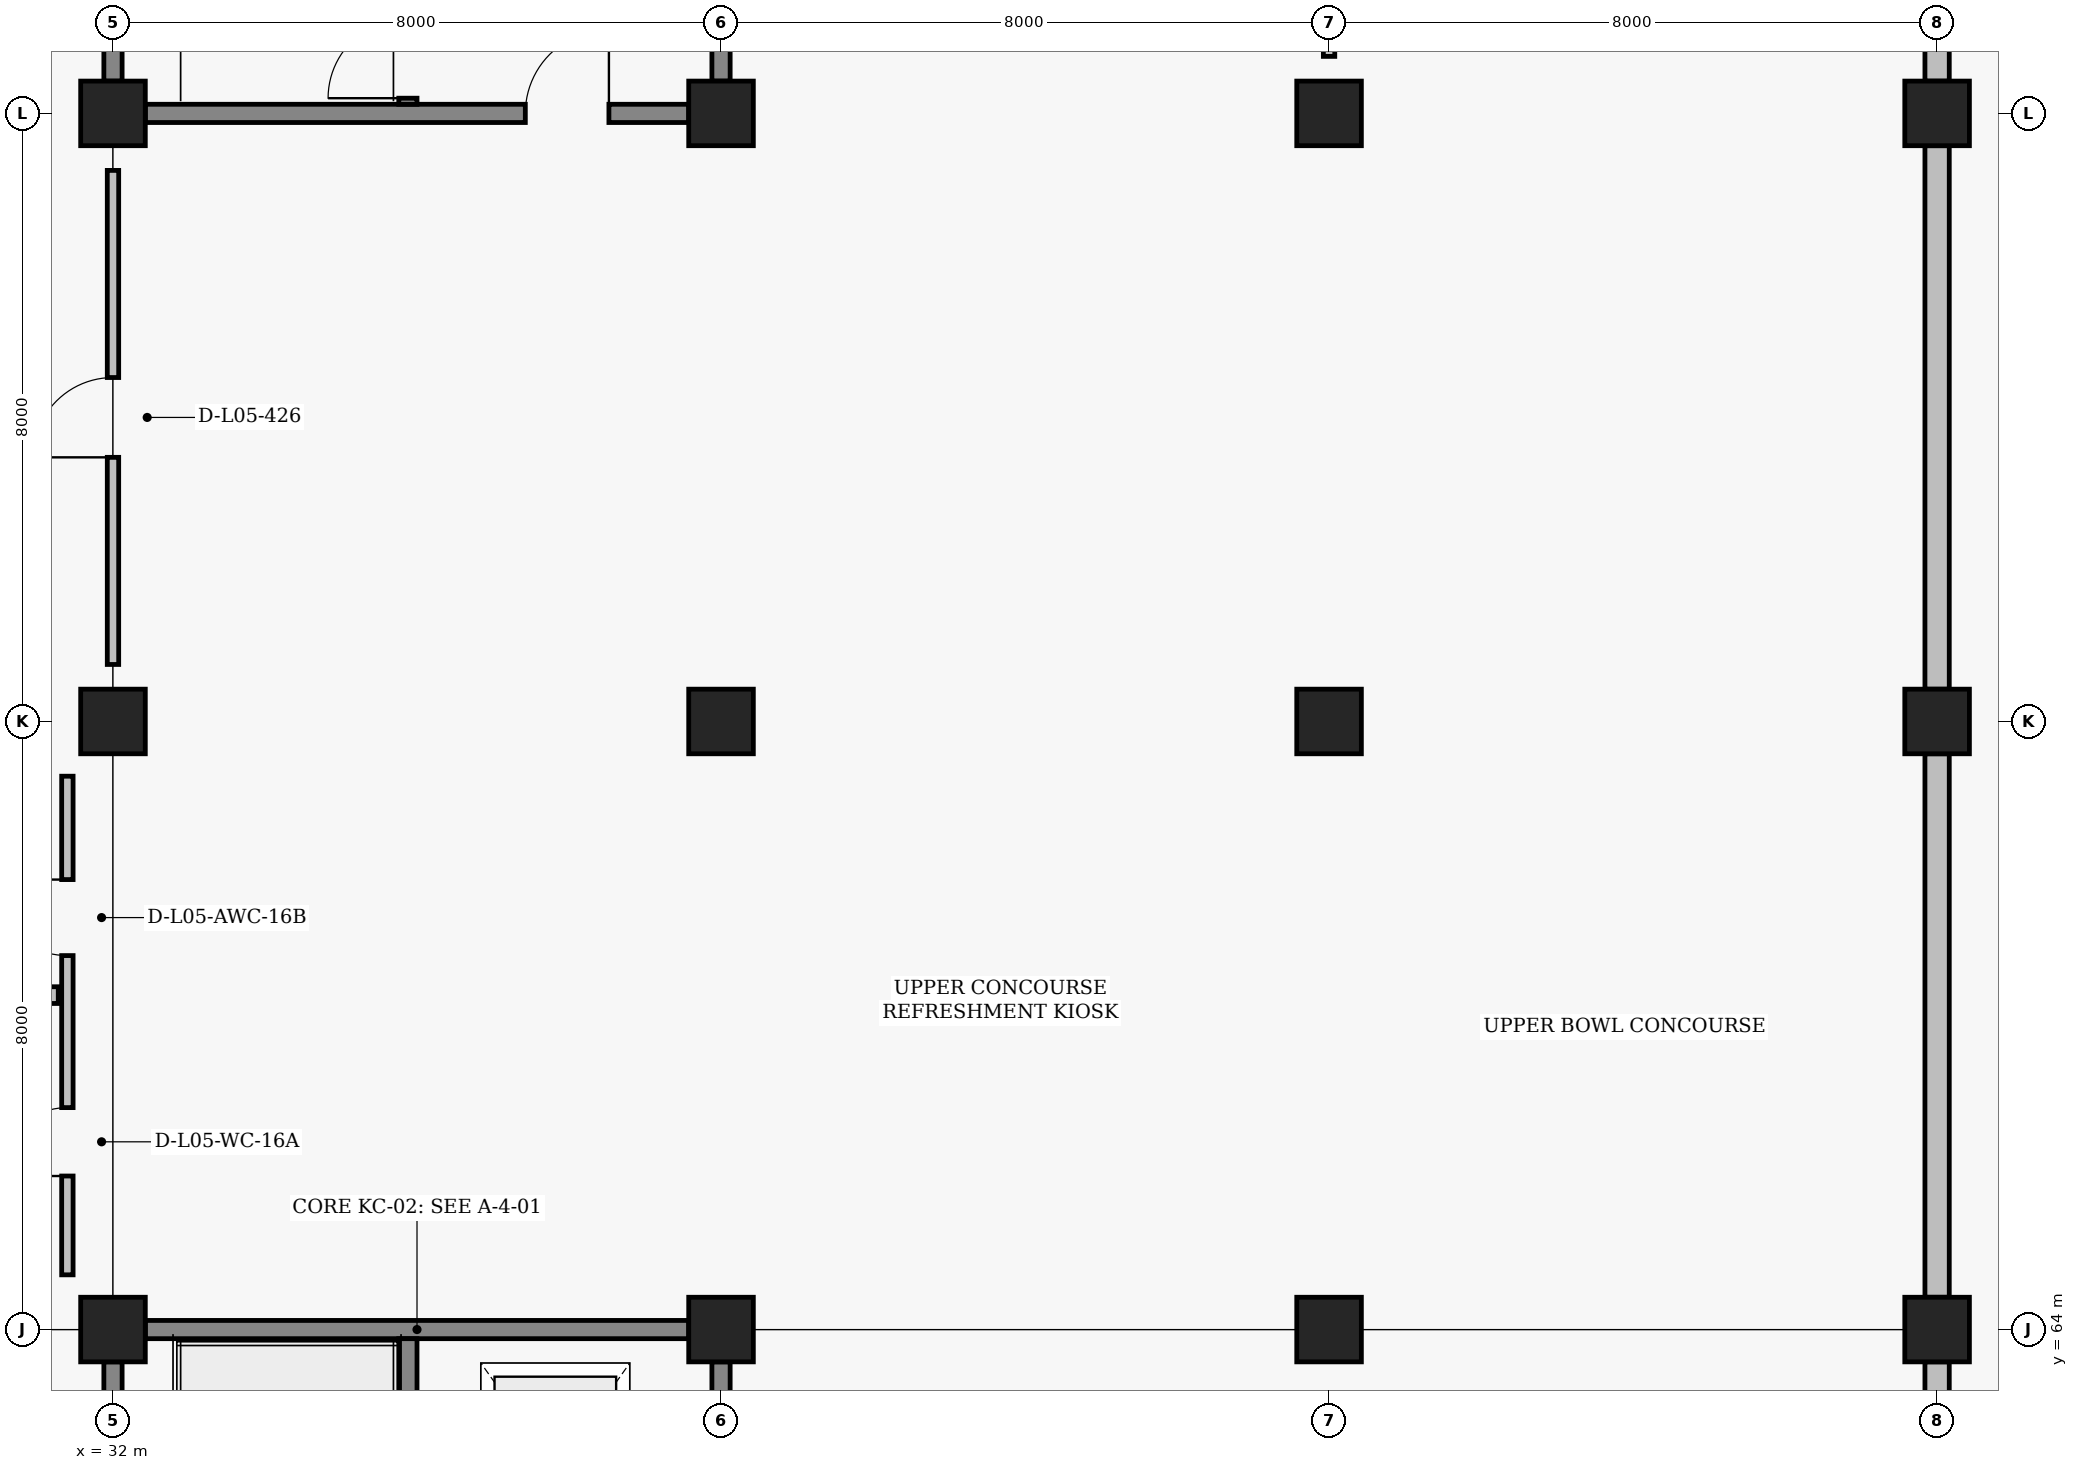
"""IFC4 building model, lengths in metres.
Left out: names, types, materials, properties, quantities, classifications, styles, units other than length and angle.
Written with IfcOpenShell. Run it as: python <this file> out.ifc"""

import sys

from ifc_helpers import new_model, si_unit, direction, frame, frame_2d, origin, origin_2d, place, context, subcontext, project, spatial, rectangle, extrude, element, fill, save


model = new_model("IFC4")
c1 = context("Model", 3, precision=1e-05, world=origin(), true_north=direction((0.0, 1.0)))
c2 = subcontext(c1, "Body", "Model", "MODEL_VIEW")
j1 = project(units=[si_unit("LENGTHUNIT", "METRE"), si_unit("PLANEANGLEUNIT", "RADIAN")], contexts=[c1])
p1 = place(None, origin())
s1 = spatial("IfcSite", under=j1, at=p1, CompositionType="ELEMENT")
p2 = place(p1, origin())
s2 = spatial("IfcBuilding", under=s1, at=p2, CompositionType="ELEMENT")
p3 = place(p2, frame((0.0, 0.0, 18.6)))
s3 = spatial("IfcBuildingStorey", under=s2, at=p3, CompositionType="ELEMENT", Elevation=18.6)
for number, where, z_axis, x_axis in (
    (1, (32.0, 64.0, 0.0), (0.0, 0.0, 1.0), (1.0, 0.0, 0.0)),
    (2, (32.0, 72.0, 0.0), (0.0, 0.0, 1.0), (1.0, 0.0, 0.0)),
    (3, (32.0, 80.0, 0.0), (0.0, 0.0, 1.0), (1.0, 0.0, 0.0)),
    (4, (40.0, 64.0, 0.0), (0.0, 0.0, 1.0), (1.0, 0.0, 0.0)),
    (5, (40.0, 72.0, 0.0), (0.0, 0.0, 1.0), (1.0, 0.0, 0.0)),
    (6, (40.0, 80.0, 0.0), (0.0, 0.0, 1.0), (1.0, 0.0, 0.0)),
    (7, (48.0, 64.0, 0.0), (0.0, 0.0, 1.0), (1.0, 0.0, 0.0)),
    (8, (48.0, 72.0, 0.0), (0.0, 0.0, 1.0), (1.0, 0.0, 0.0)),
    (9, (48.0, 80.0, 0.0), (0.0, 0.0, 1.0), (1.0, 0.0, 0.0)),
    (10, (56.0, 64.0, 0.0), (0.0, 0.0, 1.0), (1.0, 0.0, 0.0)),
    (11, (56.0, 72.0, 0.0), (0.0, 0.0, 1.0), (1.0, 0.0, 0.0)),
    (12, (56.0, 80.0, 0.0), (0.0, 0.0, 1.0), (1.0, 0.0, 0.0)),
):
    element("IfcColumn", number, at=place(p3, frame(where, z_axis=z_axis, x_axis=x_axis)), inside=s3, PredefinedType="COLUMN", context=c2, shape_type="SweptSolid", body=[
        extrude(rectangle(XDim=0.85, YDim=0.85, at=origin_2d()), origin(), (0.0, 0.0, 1.0), 4.2),
    ])
for number, where, z_axis, x_axis in (
    (13, (56.0, 56.425, 0.0), (0.0, 0.0, 1.0), (0.0, 1.0, 0.0)),
    (14, (56.0, 64.425, 0.0), (0.0, 0.0, 1.0), (0.0, 1.0, 0.0)),
    (15, (56.0, 72.425, 0.0), (0.0, 0.0, 1.0), (0.0, 1.0, 0.0)),
    (16, (56.0, 80.425, 0.0), (0.0, 0.0, 1.0), (0.0, 1.0, 0.0)),
):
    element("IfcWall", number, at=place(p3, frame(where, z_axis=z_axis, x_axis=x_axis)), inside=s3, PredefinedType="SOLIDWALL", context=c2, shape_type="SweptSolid", body=[
        extrude(rectangle(XDim=7.15, YDim=0.32, at=frame_2d((3.575, 0.0))), origin(), (0.0, 0.0, 1.0), 3.35),
    ])
for number, where, z_axis, x_axis in (
    (17, (32.425, 64.0, 0.0), (0.0, 0.0, 1.0), (1.0, 0.0, 0.0)),
    (18, (32.0, 56.425, 0.0), (0.0, 0.0, 1.0), (0.0, 1.0, 0.0)),
    (19, (40.0, 56.425, 0.0), (0.0, 0.0, 1.0), (0.0, 1.0, 0.0)),
):
    element("IfcWall", number, at=place(p3, frame(where, z_axis=z_axis, x_axis=x_axis)), inside=s3, PredefinedType="SHEAR", context=c2, shape_type="SweptSolid", body=[
        extrude(rectangle(XDim=7.15, YDim=0.24, at=frame_2d((3.575, 0.0))), origin(), (0.0, 0.0, 1.0), 3.34),
    ])
p4 = place(p3, frame((35.88, 56.12, 0.0), z_axis=(0.0, 0.0, 1.0), x_axis=(0.0, 1.0, 0.0)))
e20 = element("IfcWall", 20, at=p4, inside=s3, PredefinedType="SHEAR", context=c2, shape_type="SweptSolid", body=[
    extrude(rectangle(XDim=7.76, YDim=0.24, at=frame_2d((3.88, 0.0))), origin(), (0.0, 0.0, 1.0), 3.44),
])
p5 = place(p4, frame((0.08, 0.0, 0.0)))
e21 = element("IfcOpeningElement", 21, at=p5, cuts=e20, PredefinedType="OPENING", context=c2, shape_type="SweptSolid", body=[
    extrude(rectangle(XDim=1.05, YDim=2.15, at=frame_2d((0.525, 1.075))), frame((0.0, 0.13, 0.0), z_axis=(0.0, -1.0, 0.0), x_axis=(1.0, 0.0, 0.0)), (0.0, 0.0, 1.0), 0.26),
])
p6 = place(p3, frame((32.425, 80.0, 0.0), z_axis=(0.0, 0.0, 1.0), x_axis=(1.0, 0.0, 0.0)))
e22 = element("IfcWall", 22, at=p6, inside=s3, PredefinedType="SHEAR", context=c2, shape_type="SweptSolid", body=[
    extrude(rectangle(XDim=7.15, YDim=0.24, at=frame_2d((3.575, 0.0))), origin(), (0.0, 0.0, 1.0), 3.34),
])
p7 = place(p6, frame((5.0, 0.0, 0.0)))
e23 = element("IfcOpeningElement", 23, at=p7, cuts=e22, PredefinedType="OPENING", context=c2, shape_type="SweptSolid", body=[
    extrude(rectangle(XDim=1.1, YDim=2.2, at=frame_2d((0.55, 1.1))), frame((0.0, 0.13, 0.0), z_axis=(0.0, -1.0, 0.0), x_axis=(1.0, 0.0, 0.0)), (0.0, 0.0, 1.0), 0.26),
])
for number, where, z_axis, x_axis in (
    (24, (32.0, 80.425, 0.0), (0.0, 0.0, 1.0), (0.0, 1.0, 0.0)),
    (25, (40.0, 80.425, 0.0), (0.0, 0.0, 1.0), (0.0, 1.0, 0.0)),
):
    element("IfcWall", number, at=place(p3, frame(where, z_axis=z_axis, x_axis=x_axis)), inside=s3, PredefinedType="SHEAR", context=c2, shape_type="SweptSolid", body=[
        extrude(rectangle(XDim=7.15, YDim=0.24, at=frame_2d((3.575, 0.0))), origin(), (0.0, 0.0, 1.0), 3.34),
    ])
p8 = place(p3, frame((35.88, 80.12, 0.0), z_axis=(0.0, 0.0, 1.0), x_axis=(0.0, 1.0, 0.0)))
e26 = element("IfcWall", 26, at=p8, inside=s3, PredefinedType="SHEAR", context=c2, shape_type="SweptSolid", body=[
    extrude(rectangle(XDim=7.76, YDim=0.24, at=frame_2d((3.88, 0.0))), origin(), (0.0, 0.0, 1.0), 3.44),
])
p9 = place(p8, frame((0.08, 0.0, 0.0)))
e27 = element("IfcOpeningElement", 27, at=p9, cuts=e26, PredefinedType="OPENING", context=c2, shape_type="SweptSolid", body=[
    extrude(rectangle(XDim=1.05, YDim=2.15, at=frame_2d((0.525, 1.075))), frame((0.0, 0.13, 0.0), z_axis=(0.0, -1.0, 0.0), x_axis=(1.0, 0.0, 0.0)), (0.0, 0.0, 1.0), 0.26),
])
p10 = place(p3, frame((24.72, 68.4, 0.0), z_axis=(0.0, 0.0, 1.0), x_axis=(1.0, 0.0, 0.0)))
e28 = element("IfcWall", 28, at=p10, inside=s3, PredefinedType="PLUMBINGWALL", context=c2, shape_type="SweptSolid", body=[
    extrude(rectangle(XDim=6.56, YDim=0.22, at=frame_2d((3.28, 0.0))), origin(), (0.0, 0.0, 1.0), 3.64),
])
p11 = place(p3, frame((31.4, 64.72, 0.0), z_axis=(0.0, 0.0, 1.0), x_axis=(0.0, 1.0, 0.0)))
e29 = element("IfcWall", 29, at=p11, inside=s3, PredefinedType="PARTITIONING", context=c2, shape_type="SweptSolid", body=[
    extrude(rectangle(XDim=6.56, YDim=0.15, at=frame_2d((3.28, 0.0))), origin(), (0.0, 0.0, 1.0), 3.64),
])
p12 = place(p11, frame((1.3, 0.0, 0.0)))
e30 = element("IfcOpeningElement", 30, at=p12, cuts=e29, PredefinedType="OPENING", context=c2, shape_type="SweptSolid", body=[
    extrude(rectangle(XDim=0.9, YDim=2.1, at=frame_2d((0.45, 1.05))), frame((0.0, 0.085, 0.0), z_axis=(0.0, -1.0, 0.0), x_axis=(1.0, 0.0, 0.0)), (0.0, 0.0, 1.0), 0.17),
])
p13 = place(p11, frame((4.2, 0.0, 0.0)))
e31 = element("IfcOpeningElement", 31, at=p13, cuts=e29, PredefinedType="OPENING", context=c2, shape_type="SweptSolid", body=[
    extrude(rectangle(XDim=1.0, YDim=2.15, at=frame_2d((0.5, 1.075))), frame((0.0, 0.085, 0.0), z_axis=(0.0, -1.0, 0.0), x_axis=(1.0, 0.0, 0.0)), (0.0, 0.0, 1.0), 0.17),
])
p14 = place(p3, frame((32.0, 72.75, 0.0), z_axis=(0.0, 0.0, 1.0), x_axis=(0.0, 1.0, 0.0)))
e32 = element("IfcWall", 32, at=p14, inside=s3, PredefinedType="PARTITIONING", context=c2, shape_type="SweptSolid", body=[
    extrude(rectangle(XDim=6.5, YDim=0.15, at=frame_2d((3.25, 0.0))), origin(), (0.0, 0.0, 1.0), 3.34),
])
p15 = place(p14, frame((2.725, 0.0, 0.0)))
e33 = element("IfcOpeningElement", 33, at=p15, cuts=e32, PredefinedType="OPENING", context=c2, shape_type="SweptSolid", body=[
    extrude(rectangle(XDim=1.05, YDim=2.15, at=frame_2d((0.525, 1.075))), frame((0.0, 0.085, 0.0), z_axis=(0.0, -1.0, 0.0), x_axis=(1.0, 0.0, 0.0)), (0.0, 0.0, 1.0), 0.17),
])
p16 = place(p3, frame((48.0, 80.75, 0.0), z_axis=(0.0, 0.0, 1.0), x_axis=(0.0, 1.0, 0.0)))
e34 = element("IfcWall", 34, at=p16, inside=s3, PredefinedType="PARTITIONING", context=c2, shape_type="SweptSolid", body=[
    extrude(rectangle(XDim=6.5, YDim=0.15, at=frame_2d((3.25, 0.0))), origin(), (0.0, 0.0, 1.0), 3.34),
])
p17 = place(p16, frame((2.725, 0.0, 0.0)))
e35 = element("IfcOpeningElement", 35, at=p17, cuts=e34, PredefinedType="OPENING", context=c2, shape_type="SweptSolid", body=[
    extrude(rectangle(XDim=1.05, YDim=2.15, at=frame_2d((0.525, 1.075))), frame((0.0, 0.085, 0.0), z_axis=(0.0, -1.0, 0.0), x_axis=(1.0, 0.0, 0.0)), (0.0, 0.0, 1.0), 0.17),
])
p18 = place(p7, origin())
e36 = element("IfcDoor", 36, at=p18, inside=s3, OperationType="SINGLE_SWING_RIGHT", PredefinedType="DOOR", context=c2, shape_type="SweptSolid", body=[
    extrude(rectangle(XDim=1.1, YDim=2.2, at=frame_2d((0.55, 1.1))), frame((0.0, 0.025, 0.0), z_axis=(0.0, -1.0, 0.0), x_axis=(1.0, 0.0, 0.0)), (0.0, 0.0, 1.0), 0.05),
])
fill(e23, e36)
p19 = place(p9, origin())
e37 = element("IfcDoor", 37, at=p19, inside=s3, OperationType="SINGLE_SWING_LEFT", PredefinedType="DOOR", context=c2, shape_type="SweptSolid", body=[
    extrude(rectangle(XDim=1.05, YDim=2.15, at=frame_2d((0.525, 1.075))), frame((0.0, 0.025, 0.0), z_axis=(0.0, -1.0, 0.0), x_axis=(1.0, 0.0, 0.0)), (0.0, 0.0, 1.0), 0.05),
])
fill(e27, e37)
p20 = place(p12, origin())
e38 = element("IfcDoor", 38, at=p20, inside=s3, OperationType="SINGLE_SWING_LEFT", PredefinedType="DOOR", context=c2, shape_type="SweptSolid", body=[
    extrude(rectangle(XDim=0.9, YDim=2.1, at=frame_2d((0.45, 1.05))), frame((0.0, 0.025, 0.0), z_axis=(0.0, -1.0, 0.0), x_axis=(1.0, 0.0, 0.0)), (0.0, 0.0, 1.0), 0.05),
])
fill(e30, e38)
p21 = place(p13, origin())
e39 = element("IfcDoor", 39, at=p21, inside=s3, OperationType="SINGLE_SWING_RIGHT", PredefinedType="DOOR", context=c2, shape_type="SweptSolid", body=[
    extrude(rectangle(XDim=1.0, YDim=2.15, at=frame_2d((0.5, 1.075))), frame((0.0, 0.025, 0.0), z_axis=(0.0, -1.0, 0.0), x_axis=(1.0, 0.0, 0.0)), (0.0, 0.0, 1.0), 0.05),
])
fill(e31, e39)
p22 = place(p15, origin())
e40 = element("IfcDoor", 40, at=p22, inside=s3, OperationType="SINGLE_SWING_LEFT", PredefinedType="DOOR", context=c2, shape_type="SweptSolid", body=[
    extrude(rectangle(XDim=1.05, YDim=2.15, at=frame_2d((0.525, 1.075))), frame((0.0, 0.025, 0.0), z_axis=(0.0, -1.0, 0.0), x_axis=(1.0, 0.0, 0.0)), (0.0, 0.0, 1.0), 0.05),
])
fill(e33, e40)
save(model, sys.argv[1])
